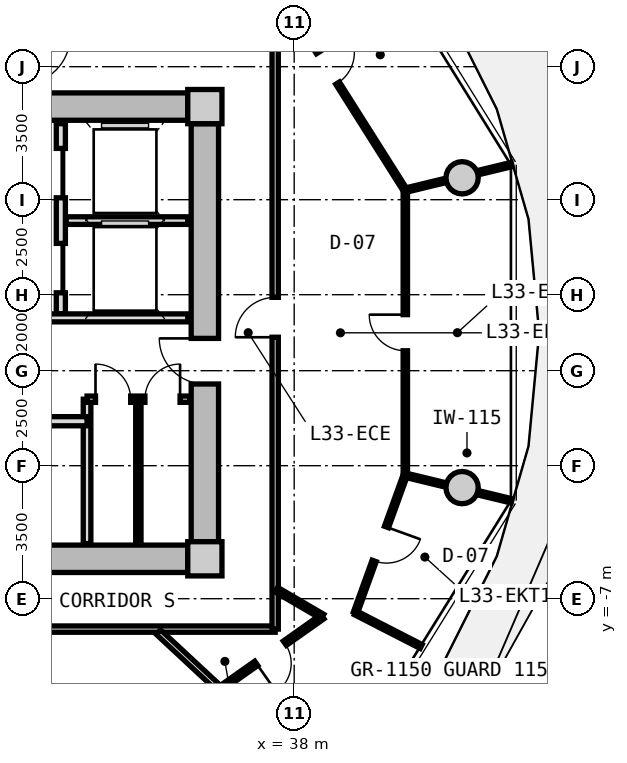
"""IFC4 building model, lengths in metres.
Left out: names, types, materials, properties, quantities, classifications, styles, units other than length and angle.
Written with IfcOpenShell. Run it as: python <this file> out.ifc"""

import sys

from ifc_helpers import new_model, si_unit, direction, frame, frame_2d, origin, origin_2d, place, context, subcontext, project, spatial, rectangle, circle, extrude, source, transform, mapped, element, fill, save


model = new_model("IFC4")
c1 = context("Model", 3, precision=1e-05, world=origin(), true_north=direction((0.0, 1.0)))
c2 = subcontext(c1, "Body", "Model", "MODEL_VIEW")
j1 = project(units=[si_unit("LENGTHUNIT", "METRE"), si_unit("PLANEANGLEUNIT", "RADIAN")], contexts=[c1])
p1 = place(None, origin())
s1 = spatial("IfcSite", under=j1, at=p1, CompositionType="ELEMENT")
p2 = place(p1, origin())
s2 = spatial("IfcBuilding", under=s1, at=p2, CompositionType="ELEMENT")
p3 = place(p2, frame((0.0, 0.0, 108.45)))
s3 = spatial("IfcBuildingStorey", under=s2, at=p3, CompositionType="ELEMENT", Elevation=108.45)
m1 = source(origin(), c2, "Body", "SweptSolid", [
    extrude(rectangle(XDim=0.9, YDim=0.9, at=origin_2d()), origin(), (0.0, 0.0, 1.0), 3.05),
])
for number, where, z_axis, x_axis in (
    (1, (35.65, -5.95, 0.0), (0.0, 0.0, 1.0), (1.0, 0.0, 0.0)),
    (2, (35.65, 5.95, 0.0), (0.0, 0.0, 1.0), (1.0, 0.0, 0.0)),
):
    element("IfcColumn", number, at=place(p3, frame(where, z_axis=z_axis, x_axis=x_axis)), inside=s3, PredefinedType="COLUMN", context=c2, shape_type="MappedRepresentation", body=[
        mapped(m1, transform((0.0, 0.0, 0.0), x_axis=(1.0, 0.0, 0.0), y_axis=(0.0, 1.0, 0.0), z_axis=(0.0, 0.0, 1.0), scale=1.0)),
    ])
m2 = source(origin(), c2, "Body", "SweptSolid", [
    extrude(rectangle(XDim=14.4, YDim=0.72, at=frame_2d((7.2, 0.0))), origin(), (0.0, 0.0, 1.0), 2.79),
])
for number, where, z_axis, x_axis in (
    (3, (20.8, 5.95, 0.0), (0.0, 0.0, 1.0), (1.0, 0.0, 0.0)),
    (4, (35.2, -5.95, 0.0), (0.0, 0.0, 1.0), (-1.0, 0.0, 0.0)),
):
    element("IfcWall", number, at=place(p3, frame(where, z_axis=z_axis, x_axis=x_axis)), inside=s3, PredefinedType="SHEAR", context=c2, shape_type="MappedRepresentation", body=[
        mapped(m2, transform((0.0, 0.0, 0.0), x_axis=(1.0, 0.0, 0.0), y_axis=(0.0, 1.0, 0.0), z_axis=(0.0, 0.0, 1.0), scale=1.0)),
    ])
m3 = source(origin(), c2, "Body", "SweptSolid", [
    extrude(rectangle(XDim=11.0, YDim=0.72, at=frame_2d((5.5, 0.0))), origin(), (0.0, 0.0, 1.0), 2.79),
])
p4 = place(p3, frame((35.65, 5.5, 0.0), z_axis=(0.0, 0.0, 1.0), x_axis=(0.0, -1.0, 0.0)))
e5 = element("IfcWall", 5, at=p4, inside=s3, PredefinedType="SHEAR", context=c2, shape_type="MappedRepresentation", body=[
    mapped(m3, transform((0.0, 0.0, 0.0), x_axis=(1.0, 0.0, 0.0), y_axis=(0.0, 1.0, 0.0), z_axis=(0.0, 0.0, 1.0), scale=1.0)),
])
p5 = place(p4, frame((5.65, 0.0, 0.0)))
e6 = element("IfcOpeningElement", 6, at=p5, cuts=e5, PredefinedType="OPENING", context=c2, shape_type="SweptSolid", body=[
    extrude(rectangle(XDim=1.2, YDim=2.15, at=frame_2d((0.6, 1.075))), frame((0.0, 0.37, 0.0), z_axis=(0.0, -1.0, 0.0), x_axis=(1.0, 0.0, 0.0)), (0.0, 0.0, 1.0), 0.74),
])
m4 = source(origin(), c2, "Body", "SweptSolid", [
    extrude(circle(Radius=0.425, at=origin_2d()), origin(), (0.0, 0.0, 1.0), 3.05),
])
for number, where, z_axis, x_axis in (
    (7, (42.419, 4.076, 0.0), (0.0, 0.0, 1.0), (1.0, 0.0, 0.0)),
    (8, (42.419, -4.076, 0.0), (0.0, 0.0, 1.0), (1.0, 0.0, 0.0)),
):
    element("IfcColumn", number, at=place(p3, frame(where, z_axis=z_axis, x_axis=x_axis)), inside=s3, PredefinedType="COLUMN", context=c2, shape_type="MappedRepresentation", body=[
        mapped(m4, transform((0.0, 0.0, 0.0), x_axis=(1.0, 0.0, 0.0), y_axis=(0.0, 1.0, 0.0), z_axis=(0.0, 0.0, 1.0), scale=1.0)),
    ])
m5 = source(origin(), c2, "Body", "SweptSolid", [
    extrude(rectangle(XDim=5.0, YDim=0.24, at=frame_2d((2.5, 0.0))), origin(), (0.0, 0.0, 1.0), 2.775),
])
p6 = place(p3, frame((31.86, 0.5, 0.0), z_axis=(0.0, 0.0, 1.0), x_axis=(0.0, 1.0, 0.0)))
e9 = element("IfcWall", 9, at=p6, inside=s3, PredefinedType="PARTITIONING", context=c2, shape_type="MappedRepresentation", body=[
    mapped(m5, transform((0.0, 0.0, 0.0), x_axis=(1.0, 0.0, 0.0), y_axis=(0.0, 1.0, 0.0), z_axis=(0.0, 0.0, 1.0), scale=1.0)),
])
p7 = place(p6, frame((3.05, 0.0, 0.0)))
e10 = element("IfcOpeningElement", 10, at=p7, cuts=e9, PredefinedType="OPENING", context=c2, shape_type="SweptSolid", body=[
    extrude(rectangle(XDim=1.3, YDim=2.2, at=frame_2d((0.65, 1.1))), frame((0.0, 0.13, 0.0), z_axis=(0.0, -1.0, 0.0), x_axis=(1.0, 0.0, 0.0)), (0.0, 0.0, 1.0), 0.26),
])
p8 = place(p6, frame((0.55, 0.0, 0.0)))
e11 = element("IfcOpeningElement", 11, at=p8, cuts=e9, PredefinedType="OPENING", context=c2, shape_type="SweptSolid", body=[
    extrude(rectangle(XDim=1.3, YDim=2.2, at=frame_2d((0.65, 1.1))), frame((0.0, 0.13, 0.0), z_axis=(0.0, -1.0, 0.0), x_axis=(1.0, 0.0, 0.0)), (0.0, 0.0, 1.0), 0.26),
])
m6 = source(origin(), c2, "Body", "SweptSolid", [
    extrude(rectangle(XDim=3.2, YDim=0.2, at=frame_2d((1.6, 0.0))), origin(), (0.0, 0.0, 1.0), 2.775),
])
p9 = place(p3, frame((32.0, 2.95, 0.0), z_axis=(0.0, 0.0, 1.0), x_axis=(1.0, 0.0, 0.0)))
e12 = element("IfcWall", 12, at=p9, inside=s3, PredefinedType="PARTITIONING", context=c2, shape_type="MappedRepresentation", body=[
    mapped(m6, transform((0.0, 0.0, 0.0), x_axis=(1.0, 0.0, 0.0), y_axis=(0.0, 1.0, 0.0), z_axis=(0.0, 0.0, 1.0), scale=1.0)),
])
m7 = source(origin(), c2, "Body", "SweptSolid", [
    extrude(rectangle(XDim=6.66, YDim=0.21, at=frame_2d((3.33, 0.0))), origin(), (0.0, 0.0, 1.0), 2.775),
])
p10 = place(p3, frame((28.54, 0.39, 0.0), z_axis=(0.0, 0.0, 1.0), x_axis=(1.0, 0.0, 0.0)))
e13 = element("IfcWall", 13, at=p10, inside=s3, PredefinedType="PARTITIONING", context=c2, shape_type="MappedRepresentation", body=[
    mapped(m7, transform((0.0, 0.0, 0.0), x_axis=(1.0, 0.0, 0.0), y_axis=(0.0, 1.0, 0.0), z_axis=(0.0, 0.0, 1.0), scale=1.0)),
])
p11 = place(p10, frame((1.0, 0.0, 0.0)))
e14 = element("IfcOpeningElement", 14, at=p11, cuts=e13, PredefinedType="OPENING", context=c2, shape_type="SweptSolid", body=[
    extrude(rectangle(XDim=1.2, YDim=2.15, at=frame_2d((0.6, 1.075))), frame((0.0, 0.115, 0.0), z_axis=(0.0, -1.0, 0.0), x_axis=(1.0, 0.0, 0.0)), (0.0, 0.0, 1.0), 0.23),
])
m8 = source(origin(), c2, "Body", "SweptSolid", [
    extrude(rectangle(XDim=3.8, YDim=0.2, at=frame_2d((1.9, 0.0))), origin(), (0.0, 0.0, 1.0), 2.775),
])
p12 = place(p3, frame((32.55, -5.55, 0.0), z_axis=(0.0, 0.0, 1.0), x_axis=(0.0, 1.0, 0.0)))
e15 = element("IfcWall", 15, at=p12, inside=s3, PredefinedType="PARTITIONING", context=c2, shape_type="MappedRepresentation", body=[
    mapped(m8, transform((0.0, 0.0, 0.0), x_axis=(1.0, 0.0, 0.0), y_axis=(0.0, 1.0, 0.0), z_axis=(0.0, 0.0, 1.0), scale=1.0)),
])
m9 = source(origin(), c2, "Body", "SweptSolid", [
    extrude(rectangle(XDim=4.13, YDim=0.24, at=frame_2d((2.065, 0.0))), origin(), (0.0, 0.0, 1.0), 2.775),
])
p13 = place(p3, frame((28.42, -2.33, 0.0), z_axis=(0.0, 0.0, 1.0), x_axis=(1.0, 0.0, 0.0)))
e16 = element("IfcWall", 16, at=p13, inside=s3, PredefinedType="PARTITIONING", context=c2, shape_type="MappedRepresentation", body=[
    mapped(m9, transform((0.0, 0.0, 0.0), x_axis=(1.0, 0.0, 0.0), y_axis=(0.0, 1.0, 0.0), z_axis=(0.0, 0.0, 1.0), scale=1.0)),
])
p14 = place(p13, frame((0.5, 0.0, 0.0)))
e17 = element("IfcOpeningElement", 17, at=p14, cuts=e16, PredefinedType="OPENING", context=c2, shape_type="SweptSolid", body=[
    extrude(rectangle(XDim=1.1, YDim=2.2, at=frame_2d((0.55, 1.1))), frame((0.0, 0.13, 0.0), z_axis=(0.0, -1.0, 0.0), x_axis=(1.0, 0.0, 0.0)), (0.0, 0.0, 1.0), 0.26),
])
m10 = source(origin(), c2, "Body", "SweptSolid", [
    extrude(rectangle(XDim=2.7, YDim=0.165, at=frame_2d((1.35, 0.0))), origin(), (0.0, 0.0, 1.0), 2.775),
])
p15 = place(p3, frame((32.55, -1.75, 0.0), z_axis=(0.0, 0.0, 1.0), x_axis=(1.0, 0.0, 0.0)))
e18 = element("IfcWall", 18, at=p15, inside=s3, PredefinedType="PARTITIONING", context=c2, shape_type="MappedRepresentation", body=[
    mapped(m10, transform((0.0, 0.0, 0.0), x_axis=(1.0, 0.0, 0.0), y_axis=(0.0, 1.0, 0.0), z_axis=(0.0, 0.0, 1.0), scale=1.0)),
])
p16 = place(p15, frame((0.222, 0.0, 0.0)))
e19 = element("IfcOpeningElement", 19, at=p16, cuts=e18, PredefinedType="OPENING", context=c2, shape_type="SweptSolid", body=[
    extrude(rectangle(XDim=0.925, YDim=2.1, at=frame_2d((0.462, 1.05))), frame((0.0, 0.093, 0.0), z_axis=(0.0, -1.0, 0.0), x_axis=(1.0, 0.0, 0.0)), (0.0, 0.0, 1.0), 0.185),
])
p17 = place(p15, frame((1.522, 0.0, 0.0)))
e20 = element("IfcOpeningElement", 20, at=p17, cuts=e18, PredefinedType="OPENING", context=c2, shape_type="SweptSolid", body=[
    extrude(rectangle(XDim=0.925, YDim=2.1, at=frame_2d((0.462, 1.05))), frame((0.0, 0.093, 0.0), z_axis=(0.0, -1.0, 0.0), x_axis=(1.0, 0.0, 0.0)), (0.0, 0.0, 1.0), 0.185),
])
m11 = source(origin(), c2, "Body", "SweptSolid", [
    extrude(rectangle(XDim=3.8, YDim=0.14, at=frame_2d((1.9, 0.0))), origin(), (0.0, 0.0, 1.0), 2.775),
])
p18 = place(p3, frame((33.9, -5.55, 0.0), z_axis=(0.0, 0.0, 1.0), x_axis=(0.0, 1.0, 0.0)))
e21 = element("IfcWall", 21, at=p18, inside=s3, PredefinedType="PARTITIONING", context=c2, shape_type="MappedRepresentation", body=[
    mapped(m11, transform((0.0, 0.0, 0.0), x_axis=(1.0, 0.0, 0.0), y_axis=(0.0, 1.0, 0.0), z_axis=(0.0, 0.0, 1.0), scale=1.0)),
])
m12 = source(origin(), c2, "Body", "SweptSolid", [
    extrude(rectangle(XDim=8.6, YDim=0.165, at=frame_2d((4.3, 0.0))), origin(), (0.0, 0.0, 1.0), 2.775),
])
p19 = place(p3, frame((37.5, -7.8, 0.0), z_axis=(0.0, 0.0, 1.0), x_axis=(-1.0, 0.0, 0.0)))
e22 = element("IfcWall", 22, at=p19, inside=s3, PredefinedType="PARTITIONING", context=c2, shape_type="MappedRepresentation", body=[
    mapped(m12, transform((0.0, 0.0, 0.0), x_axis=(1.0, 0.0, 0.0), y_axis=(0.0, 1.0, 0.0), z_axis=(0.0, 0.0, 1.0), scale=1.0)),
])
m13 = source(origin(), c2, "Body", "SweptSolid", [
    extrude(rectangle(XDim=15.6, YDim=0.165, at=frame_2d((7.8, 0.0))), origin(), (0.0, 0.0, 1.0), 2.775),
])
p20 = place(p3, frame((37.5, 7.8, 0.0), z_axis=(0.0, 0.0, 1.0), x_axis=(0.0, -1.0, 0.0)))
e23 = element("IfcWall", 23, at=p20, inside=s3, PredefinedType="PARTITIONING", context=c2, shape_type="MappedRepresentation", body=[
    mapped(m13, transform((0.0, 0.0, 0.0), x_axis=(1.0, 0.0, 0.0), y_axis=(0.0, 1.0, 0.0), z_axis=(0.0, 0.0, 1.0), scale=1.0)),
])
p21 = place(p20, frame((6.87, 0.0, 0.0)))
e24 = element("IfcOpeningElement", 24, at=p21, cuts=e23, PredefinedType="OPENING", context=c2, shape_type="SweptSolid", body=[
    extrude(rectangle(XDim=1.05, YDim=2.15, at=frame_2d((0.525, 1.075))), frame((0.0, 0.093, 0.0), z_axis=(0.0, -1.0, 0.0), x_axis=(1.0, 0.0, 0.0)), (0.0, 0.0, 1.0), 0.185),
])
m14 = source(origin(), c2, "Body", "SweptSolid", [
    extrude(rectangle(XDim=6.187, YDim=0.165, at=frame_2d((3.093, 0.0))), origin(), (0.0, 0.0, 1.0), 2.275),
])
p22 = place(p3, frame((34.429, -7.88, 0.0), z_axis=(0.0, 0.0, 1.0), x_axis=(0.732501077882, -0.680765870841, 0.0)))
e25 = element("IfcWall", 25, at=p22, inside=s3, PredefinedType="PARTITIONING", context=c2, shape_type="MappedRepresentation", body=[
    mapped(m14, transform((0.0, 0.0, 0.0), x_axis=(1.0, 0.0, 0.0), y_axis=(0.0, 1.0, 0.0), z_axis=(0.0, 0.0, 1.0), scale=1.0)),
])
m15 = source(origin(), c2, "Body", "SweptSolid", [
    extrude(rectangle(XDim=7.499, YDim=0.115, at=frame_2d((3.75, 0.0))), origin(), (0.0, 0.0, 1.0), 2.775),
])
p23 = place(p3, frame((40.925, -3.75, 0.0), z_axis=(0.0, 0.0, 1.0), x_axis=(0.0, 1.0, 0.0)))
e26 = element("IfcWall", 26, at=p23, inside=s3, PredefinedType="PARTITIONING", context=c2, shape_type="MappedRepresentation", body=[
    mapped(m15, transform((0.0, 0.0, 0.0), x_axis=(1.0, 0.0, 0.0), y_axis=(0.0, 1.0, 0.0), z_axis=(0.0, 0.0, 1.0), scale=1.0)),
])
p24 = place(p23, frame((3.275, 0.0, 0.0)))
e27 = element("IfcOpeningElement", 27, at=p24, cuts=e26, PredefinedType="OPENING", context=c2, shape_type="SweptSolid", body=[
    extrude(rectangle(XDim=0.95, YDim=2.1, at=frame_2d((0.475, 1.05))), frame((0.0, 0.067, 0.0), z_axis=(0.0, -1.0, 0.0), x_axis=(1.0, 0.0, 0.0)), (0.0, 0.0, 1.0), 0.135),
])
m16 = source(origin(), c2, "Body", "SweptSolid", [
    extrude(rectangle(XDim=2.879, YDim=0.115, at=frame_2d((1.439, 0.0))), origin(), (0.0, 0.0, 1.0), 2.275),
])
p25 = place(p3, frame((40.925, -3.75, 0.0), z_axis=(0.0, 0.0, 1.0), x_axis=(0.972018140943, -0.234905797454, 0.0)))
e28 = element("IfcWall", 28, at=p25, inside=s3, PredefinedType="PARTITIONING", context=c2, shape_type="MappedRepresentation", body=[
    mapped(m16, transform((0.0, 0.0, 0.0), x_axis=(1.0, 0.0, 0.0), y_axis=(0.0, 1.0, 0.0), z_axis=(0.0, 0.0, 1.0), scale=1.0)),
])
m17 = source(origin(), c2, "Body", "SweptSolid", [
    extrude(rectangle(XDim=7.618, YDim=0.115, at=frame_2d((3.809, 0.0))), origin(), (0.0, 0.0, 1.0), 2.775),
])
p26 = place(p3, frame((40.923, 3.749, 0.0), z_axis=(0.0, 0.0, 1.0), x_axis=(-0.534316104929, 0.845284744931, 0.0)))
e29 = element("IfcWall", 29, at=p26, inside=s3, PredefinedType="PARTITIONING", context=c2, shape_type="MappedRepresentation", body=[
    mapped(m17, transform((0.0, 0.0, 0.0), x_axis=(1.0, 0.0, 0.0), y_axis=(0.0, 1.0, 0.0), z_axis=(0.0, 0.0, 1.0), scale=1.0)),
])
p27 = place(p26, frame((3.334, 0.0, 0.0)))
e30 = element("IfcOpeningElement", 30, at=p27, cuts=e29, PredefinedType="OPENING", context=c2, shape_type="SweptSolid", body=[
    extrude(rectangle(XDim=0.95, YDim=2.1, at=frame_2d((0.475, 1.05))), frame((0.0, 0.067, 0.0), z_axis=(0.0, -1.0, 0.0), x_axis=(1.0, 0.0, 0.0)), (0.0, 0.0, 1.0), 0.135),
])
m18 = source(origin(), c2, "Body", "SweptSolid", [
    extrude(rectangle(XDim=2.881, YDim=0.115, at=frame_2d((1.44, 0.0))), origin(), (0.0, 0.0, 1.0), 2.275),
])
p28 = place(p3, frame((40.923, 3.749, 0.0), z_axis=(0.0, 0.0, 1.0), x_axis=(0.972031524605, 0.234850410208, 0.0)))
e31 = element("IfcWall", 31, at=p28, inside=s3, PredefinedType="PARTITIONING", context=c2, shape_type="MappedRepresentation", body=[
    mapped(m18, transform((0.0, 0.0, 0.0), x_axis=(1.0, 0.0, 0.0), y_axis=(0.0, 1.0, 0.0), z_axis=(0.0, 0.0, 1.0), scale=1.0)),
])
m19 = source(origin(), c2, "Body", "SweptSolid", [
    extrude(rectangle(XDim=1.407, YDim=0.14, at=frame_2d((0.704, 0.0))), origin(), (0.0, 0.0, 1.0), 2.775),
])
p29 = place(p3, frame((37.53, -6.762, 0.0), z_axis=(0.0, 0.0, 1.0), x_axis=(0.863539718977, -0.504280828258, 0.0)))
e32 = element("IfcWall", 32, at=p29, inside=s3, PredefinedType="PARTITIONING", context=c2, shape_type="MappedRepresentation", body=[
    mapped(m19, transform((0.0, 0.0, 0.0), x_axis=(1.0, 0.0, 0.0), y_axis=(0.0, 1.0, 0.0), z_axis=(0.0, 0.0, 1.0), scale=1.0)),
])
m20 = source(origin(), c2, "Body", "SweptSolid", [
    extrude(rectangle(XDim=3.347, YDim=0.14, at=frame_2d((1.673, 0.0))), origin(), (0.0, 0.0, 1.0), 2.775),
])
p30 = place(p3, frame((38.745, -7.472, 0.0), z_axis=(0.0, 0.0, 1.0), x_axis=(-0.81705680263, -0.576557179537, 0.0)))
e33 = element("IfcWall", 33, at=p30, inside=s3, PredefinedType="PARTITIONING", context=c2, shape_type="MappedRepresentation", body=[
    mapped(m20, transform((0.0, 0.0, 0.0), x_axis=(1.0, 0.0, 0.0), y_axis=(0.0, 1.0, 0.0), z_axis=(0.0, 0.0, 1.0), scale=1.0)),
])
p31 = place(p30, frame((1.214, 0.0, 0.0)))
e34 = element("IfcOpeningElement", 34, at=p31, cuts=e33, PredefinedType="OPENING", context=c2, shape_type="SweptSolid", body=[
    extrude(rectangle(XDim=0.92, YDim=2.1, at=frame_2d((0.46, 1.05))), frame((0.0, 0.08, 0.0), z_axis=(0.0, -1.0, 0.0), x_axis=(1.0, 0.0, 0.0)), (0.0, 0.0, 1.0), 0.16),
])
m21 = source(origin(), c2, "Body", "SweptSolid", [
    extrude(rectangle(XDim=1.945, YDim=0.115, at=frame_2d((0.973, 0.0))), origin(), (0.0, 0.0, 1.0), 2.775),
])
p32 = place(p3, frame((39.611, -7.37, 0.0), z_axis=(0.0, 0.0, 1.0), x_axis=(0.889684148329, -0.456576517368, 0.0)))
e35 = element("IfcWall", 35, at=p32, inside=s3, PredefinedType="PARTITIONING", context=c2, shape_type="MappedRepresentation", body=[
    mapped(m21, transform((0.0, 0.0, 0.0), x_axis=(1.0, 0.0, 0.0), y_axis=(0.0, 1.0, 0.0), z_axis=(0.0, 0.0, 1.0), scale=1.0)),
])
m22 = source(origin(), c2, "Body", "SweptSolid", [
    extrude(rectangle(XDim=3.852, YDim=0.115, at=frame_2d((1.926, 0.0))), origin(), (0.0, 0.0, 1.0), 2.775),
])
p33 = place(p3, frame((39.611, -7.37, 0.0), z_axis=(0.0, 0.0, 1.0), x_axis=(0.340653649518, 0.940188859257, 0.0)))
e36 = element("IfcWall", 36, at=p33, inside=s3, PredefinedType="PARTITIONING", context=c2, shape_type="MappedRepresentation", body=[
    mapped(m22, transform((0.0, 0.0, 0.0), x_axis=(1.0, 0.0, 0.0), y_axis=(0.0, 1.0, 0.0), z_axis=(0.0, 0.0, 1.0), scale=1.0)),
])
p34 = place(p33, frame((1.451, 0.0, 0.0)))
e37 = element("IfcOpeningElement", 37, at=p34, cuts=e36, PredefinedType="OPENING", context=c2, shape_type="SweptSolid", body=[
    extrude(rectangle(XDim=0.95, YDim=2.1, at=frame_2d((0.475, 1.05))), frame((0.0, 0.067, 0.0), z_axis=(0.0, -1.0, 0.0), x_axis=(1.0, 0.0, 0.0)), (0.0, 0.0, 1.0), 0.135),
])
m23 = source(origin(), c2, "Body", "SweptSolid", [
    extrude(rectangle(XDim=1.3, YDim=2.2, at=frame_2d((0.65, 1.1))), frame((0.0, 0.025, 0.0), z_axis=(0.0, -1.0, 0.0), x_axis=(1.0, 0.0, 0.0)), (0.0, 0.0, 1.0), 0.05),
])
p35 = place(p7, origin())
e38 = element("IfcDoor", 38, at=p35, inside=s3, OperationType="SLIDING_TO_LEFT", PredefinedType="DOOR", context=c2, shape_type="MappedRepresentation", body=[
    mapped(m23, transform((0.0, 0.0, 0.0), x_axis=(1.0, 0.0, 0.0), y_axis=(0.0, 1.0, 0.0), z_axis=(0.0, 0.0, 1.0), scale=1.0)),
])
fill(e10, e38)
p36 = place(p8, origin())
e39 = element("IfcDoor", 39, at=p36, inside=s3, OperationType="SLIDING_TO_RIGHT", PredefinedType="DOOR", context=c2, shape_type="MappedRepresentation", body=[
    mapped(m23, transform((0.0, 0.0, 0.0), x_axis=(1.0, 0.0, 0.0), y_axis=(0.0, 1.0, 0.0), z_axis=(0.0, 0.0, 1.0), scale=1.0)),
])
fill(e11, e39)
m24 = source(origin(), c2, "Body", "SweptSolid", [
    extrude(rectangle(XDim=1.2, YDim=2.15, at=frame_2d((0.6, 1.075))), frame((0.0, 0.025, 0.0), z_axis=(0.0, -1.0, 0.0), x_axis=(1.0, 0.0, 0.0)), (0.0, 0.0, 1.0), 0.05),
])
p37 = place(p5, frame((1.2, 0.0, 0.0), z_axis=(0.0, 0.0, 1.0), x_axis=(-1.0, 0.0, 0.0)))
e40 = element("IfcDoor", 40, at=p37, inside=s3, OperationType="SINGLE_SWING_RIGHT", PredefinedType="DOOR", context=c2, shape_type="MappedRepresentation", body=[
    mapped(m24, transform((0.0, 0.0, 0.0), x_axis=(1.0, 0.0, 0.0), y_axis=(0.0, 1.0, 0.0), z_axis=(0.0, 0.0, 1.0), scale=1.0)),
])
fill(e6, e40)
m25 = source(origin(), c2, "Body", "SweptSolid", [
    extrude(rectangle(XDim=0.925, YDim=2.1, at=frame_2d((0.462, 1.05))), frame((0.0, 0.025, 0.0), z_axis=(0.0, -1.0, 0.0), x_axis=(1.0, 0.0, 0.0)), (0.0, 0.0, 1.0), 0.05),
])
p38 = place(p16, origin())
e41 = element("IfcDoor", 41, at=p38, inside=s3, OperationType="SINGLE_SWING_LEFT", PredefinedType="DOOR", context=c2, shape_type="MappedRepresentation", body=[
    mapped(m25, transform((0.0, 0.0, 0.0), x_axis=(1.0, 0.0, 0.0), y_axis=(0.0, 1.0, 0.0), z_axis=(0.0, 0.0, 1.0), scale=1.0)),
])
fill(e19, e41)
p39 = place(p17, origin())
e42 = element("IfcDoor", 42, at=p39, inside=s3, OperationType="SINGLE_SWING_RIGHT", PredefinedType="DOOR", context=c2, shape_type="MappedRepresentation", body=[
    mapped(m25, transform((0.0, 0.0, 0.0), x_axis=(1.0, 0.0, 0.0), y_axis=(0.0, 1.0, 0.0), z_axis=(0.0, 0.0, 1.0), scale=1.0)),
])
fill(e20, e42)
m26 = source(origin(), c2, "Body", "SweptSolid", [
    extrude(rectangle(XDim=1.05, YDim=2.15, at=frame_2d((0.525, 1.075))), frame((0.0, 0.025, 0.0), z_axis=(0.0, -1.0, 0.0), x_axis=(1.0, 0.0, 0.0)), (0.0, 0.0, 1.0), 0.05),
])
p40 = place(p21, frame((1.05, 0.0, 0.0), z_axis=(0.0, 0.0, 1.0), x_axis=(-1.0, 0.0, 0.0)))
e43 = element("IfcDoor", 43, at=p40, inside=s3, OperationType="SINGLE_SWING_LEFT", PredefinedType="DOOR", context=c2, shape_type="MappedRepresentation", body=[
    mapped(m26, transform((0.0, 0.0, 0.0), x_axis=(1.0, 0.0, 0.0), y_axis=(0.0, 1.0, 0.0), z_axis=(0.0, 0.0, 1.0), scale=1.0)),
])
fill(e24, e43)
m27 = source(origin(), c2, "Body", "SweptSolid", [
    extrude(rectangle(XDim=0.92, YDim=2.1, at=frame_2d((0.46, 1.05))), frame((0.0, 0.025, 0.0), z_axis=(0.0, -1.0, 0.0), x_axis=(1.0, 0.0, 0.0)), (0.0, 0.0, 1.0), 0.05),
])
p41 = place(p31, origin())
e44 = element("IfcDoor", 44, at=p41, inside=s3, OperationType="SINGLE_SWING_RIGHT", PredefinedType="DOOR", context=c2, shape_type="MappedRepresentation", body=[
    mapped(m27, transform((0.0, 0.0, 0.0), x_axis=(1.0, 0.0, 0.0), y_axis=(0.0, 1.0, 0.0), z_axis=(0.0, 0.0, 1.0), scale=1.0)),
])
fill(e34, e44)
m28 = source(origin(), c2, "Body", "SweptSolid", [
    extrude(rectangle(XDim=0.95, YDim=2.1, at=frame_2d((0.475, 1.05))), frame((0.0, 0.025, 0.0), z_axis=(0.0, -1.0, 0.0), x_axis=(1.0, 0.0, 0.0)), (0.0, 0.0, 1.0), 0.05),
])
p42 = place(p34, frame((0.95, 0.0, 0.0), z_axis=(0.0, 0.0, 1.0), x_axis=(-1.0, 0.0, 0.0)))
e45 = element("IfcDoor", 45, at=p42, inside=s3, OperationType="SINGLE_SWING_LEFT", PredefinedType="DOOR", context=c2, shape_type="MappedRepresentation", body=[
    mapped(m28, transform((0.0, 0.0, 0.0), x_axis=(1.0, 0.0, 0.0), y_axis=(0.0, 1.0, 0.0), z_axis=(0.0, 0.0, 1.0), scale=1.0)),
])
fill(e37, e45)
p43 = place(p24, origin())
e46 = element("IfcDoor", 46, at=p43, inside=s3, OperationType="SINGLE_SWING_RIGHT", PredefinedType="DOOR", context=c2, shape_type="MappedRepresentation", body=[
    mapped(m28, transform((0.0, 0.0, 0.0), x_axis=(1.0, 0.0, 0.0), y_axis=(0.0, 1.0, 0.0), z_axis=(0.0, 0.0, 1.0), scale=1.0)),
])
fill(e27, e46)
p44 = place(p27, frame((0.95, 0.0, 0.0), z_axis=(0.0, 0.0, 1.0), x_axis=(-1.0, 0.0, 0.0)))
e47 = element("IfcDoor", 47, at=p44, inside=s3, OperationType="SINGLE_SWING_LEFT", PredefinedType="DOOR", context=c2, shape_type="MappedRepresentation", body=[
    mapped(m28, transform((0.0, 0.0, 0.0), x_axis=(1.0, 0.0, 0.0), y_axis=(0.0, 1.0, 0.0), z_axis=(0.0, 0.0, 1.0), scale=1.0)),
])
fill(e30, e47)
save(model, sys.argv[1])
